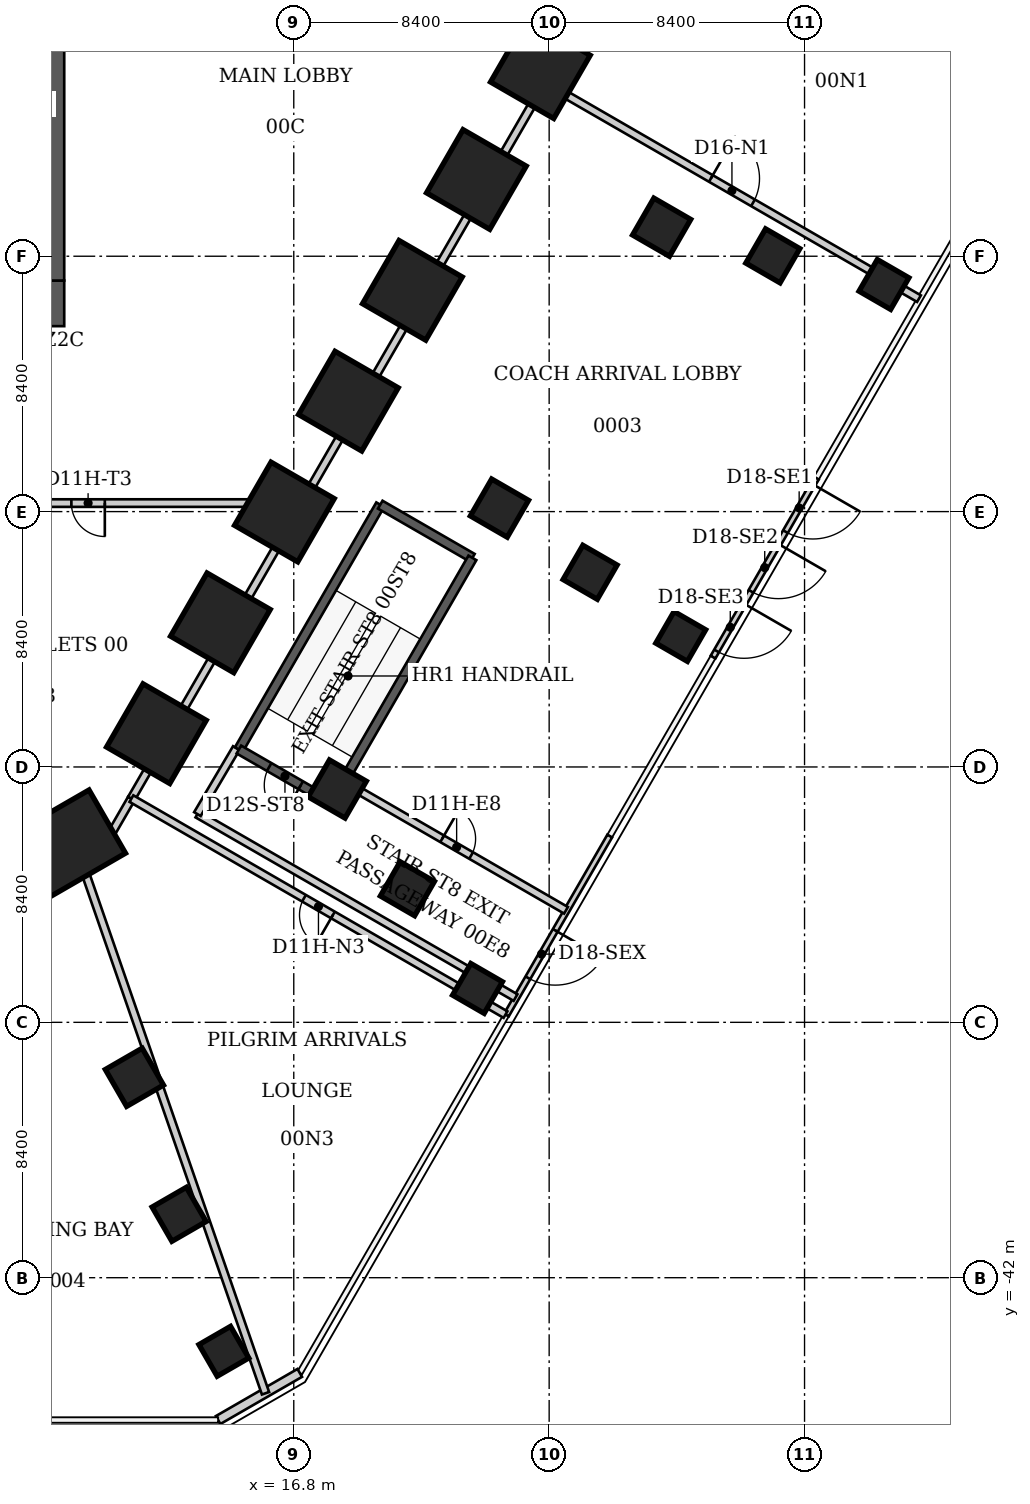
"""IFC4 building model, lengths in metres.
Left out: names, types, materials, properties, quantities, classifications, styles, units other than length and angle.
Written with IfcOpenShell. Run it as: python <this file> out.ifc"""

import sys

from ifc_helpers import new_model, si_unit, direction, frame, frame_2d, origin, origin_2d, place, context, subcontext, project, spatial, rectangle, extrude, element, fill, save


model = new_model("IFC4")
c1 = context("Model", 3, precision=1e-05, world=origin(), true_north=direction((0.0, 1.0)))
c2 = subcontext(c1, "Body", "Model", "MODEL_VIEW")
j1 = project(units=[si_unit("LENGTHUNIT", "METRE"), si_unit("PLANEANGLEUNIT", "RADIAN")], contexts=[c1])
p1 = place(None, origin())
s1 = spatial("IfcSite", under=j1, at=p1, CompositionType="ELEMENT")
p2 = place(p1, origin())
s2 = spatial("IfcBuilding", under=s1, at=p2, CompositionType="ELEMENT")
p3 = place(p2, origin())
s3 = spatial("IfcBuildingStorey", under=s2, at=p3, CompositionType="ELEMENT", Elevation=0.0)
for number, where, z_axis, x_axis in (
    (1, (24.911, -2.23, -0.2), (0.0, 0.0, 1.0), (0.866, -0.5, 0.0)),
    (2, (22.806, -5.875, -0.2), (0.0, 0.0, 1.0), (0.866, -0.5, 0.0)),
    (3, (20.701, -9.521, -0.2), (0.0, 0.0, 1.0), (0.866, -0.5, 0.0)),
    (4, (18.596, -13.167, -0.2), (0.0, 0.0, 1.0), (0.866, -0.5, 0.0)),
    (5, (16.491, -16.813, -0.2), (0.0, 0.0, 1.0), (0.866, -0.5, 0.0)),
    (6, (14.387, -20.459, -0.2), (0.0, 0.0, 1.0), (0.866, -0.5, 0.0)),
    (7, (12.282, -24.105, -0.2), (0.0, 0.0, 1.0), (0.866, -0.5, 0.0)),
):
    element("IfcColumn", number, at=place(p3, frame(where, z_axis=z_axis, x_axis=x_axis)), inside=s3, PredefinedType="COLUMN", context=c2, shape_type="SweptSolid", body=[
        extrude(rectangle(XDim=2.4, YDim=2.4, at=origin_2d()), origin(), (0.0, 0.0, 1.0), 6.2),
    ])
p4 = place(p3, frame((9.106, -27.897, -0.2), z_axis=(0.0, 0.0, 1.0), x_axis=(0.5, -0.866025403784, 0.0)))
e8 = element("IfcColumn", 8, at=p4, inside=s3, PredefinedType="COLUMN", context=c2, shape_type="SweptSolid", body=[
    extrude(rectangle(XDim=2.4, YDim=3.6, at=origin_2d()), origin(), (0.0, 0.0, 1.0), 6.2),
])
for number, where, z_axis, x_axis in (
    (9, (28.9, -7.445, -0.2), (0.0, 0.0, 1.0), (0.866, -0.5, 0.0)),
    (10, (23.565, -16.686, -0.2), (0.0, 0.0, 1.0), (0.866, -0.5, 0.0)),
    (11, (18.23, -25.926, -0.2), (0.0, 0.0, 1.0), (0.866, -0.5, 0.0)),
    (12, (11.558, -35.408, -0.2), (0.0, 0.0, 1.0), (0.5, -0.866, 0.0)),
):
    element("IfcColumn", number, at=place(p3, frame(where, z_axis=z_axis, x_axis=x_axis)), inside=s3, PredefinedType="COLUMN", context=c2, shape_type="SweptSolid", body=[
        extrude(rectangle(XDim=1.4, YDim=1.4, at=origin_2d()), origin(), (0.0, 0.0, 1.0), 6.2),
    ])
for number, where, z_axis, x_axis in (
    (13, (32.556, -8.387, -0.2), (0.0, 0.0, 1.0), (0.866, -0.5, 0.0)),
    (14, (26.547, -18.796, -0.2), (0.0, 0.0, 1.0), (0.866, -0.5, 0.0)),
    (15, (20.537, -29.205, -0.2), (0.0, 0.0, 1.0), (0.866, -0.5, 0.0)),
    (16, (13.029, -39.915, -0.2), (0.0, 0.0, 1.0), (0.5, -0.866, 0.0)),
):
    element("IfcColumn", number, at=place(p3, frame(where, z_axis=z_axis, x_axis=x_axis)), inside=s3, PredefinedType="COLUMN", context=c2, shape_type="SweptSolid", body=[
        extrude(rectangle(XDim=1.3, YDim=1.3, at=origin_2d()), origin(), (0.0, 0.0, 1.0), 6.2),
    ])
for number, where, z_axis, x_axis in (
    (17, (36.212, -9.329, -0.2), (0.0, 0.0, 1.0), (0.866, -0.5, 0.0)),
    (18, (29.528, -20.907, -0.2), (0.0, 0.0, 1.0), (0.866, -0.5, 0.0)),
    (19, (22.843, -32.485, -0.2), (0.0, 0.0, 1.0), (0.866, -0.5, 0.0)),
    (20, (14.5, -44.421, -0.2), (0.0, 0.0, 1.0), (0.5, -0.866, 0.0)),
):
    element("IfcColumn", number, at=place(p3, frame(where, z_axis=z_axis, x_axis=x_axis)), inside=s3, PredefinedType="COLUMN", context=c2, shape_type="SweptSolid", body=[
        extrude(rectangle(XDim=1.2, YDim=1.2, at=origin_2d()), origin(), (0.0, 0.0, 1.0), 6.2),
    ])
p5 = place(p3, frame((-9.25, -9.95, -0.2), z_axis=(0.0, 0.0, 1.0), x_axis=(1.0, 0.0, 0.0)))
e21 = element("IfcWall", 21, at=p5, inside=s3, PredefinedType="SHEAR", context=c2, shape_type="SweptSolid", body=[
    extrude(rectangle(XDim=18.5, YDim=1.5, at=frame_2d((9.25, 0.0))), origin(), (0.0, 0.0, 1.0), 6.2),
])
p6 = place(p5, frame((2.137, 0.0, 0.2)))
e22 = element("IfcOpeningElement", 22, at=p6, cuts=e21, PredefinedType="OPENING", context=c2, shape_type="SweptSolid", body=[
    extrude(rectangle(XDim=1.1, YDim=2.1, at=frame_2d((0.55, 1.05))), frame((0.0, 0.75, 0.0), z_axis=(0.0, -1.0, 0.0), x_axis=(1.0, 0.0, 0.0)), (0.0, 0.0, 1.0), 1.5),
])
p7 = place(p5, frame((4.762, 0.0, 0.2)))
e23 = element("IfcOpeningElement", 23, at=p7, cuts=e21, PredefinedType="OPENING", context=c2, shape_type="SweptSolid", body=[
    extrude(rectangle(XDim=1.1, YDim=2.1, at=frame_2d((0.55, 1.05))), frame((0.0, 0.75, 0.0), z_axis=(0.0, -1.0, 0.0), x_axis=(1.0, 0.0, 0.0)), (0.0, 0.0, 1.0), 1.5),
])
p8 = place(p5, frame((7.387, 0.0, 0.2)))
e24 = element("IfcOpeningElement", 24, at=p8, cuts=e21, PredefinedType="OPENING", context=c2, shape_type="SweptSolid", body=[
    extrude(rectangle(XDim=1.1, YDim=2.1, at=frame_2d((0.55, 1.05))), frame((0.0, 0.75, 0.0), z_axis=(0.0, -1.0, 0.0), x_axis=(1.0, 0.0, 0.0)), (0.0, 0.0, 1.0), 1.5),
])
p9 = place(p5, frame((10.012, 0.0, 0.2)))
e25 = element("IfcOpeningElement", 25, at=p9, cuts=e21, PredefinedType="OPENING", context=c2, shape_type="SweptSolid", body=[
    extrude(rectangle(XDim=1.1, YDim=2.1, at=frame_2d((0.55, 1.05))), frame((0.0, 0.75, 0.0), z_axis=(0.0, -1.0, 0.0), x_axis=(1.0, 0.0, 0.0)), (0.0, 0.0, 1.0), 1.5),
])
p10 = place(p5, frame((12.637, 0.0, 0.2)))
e26 = element("IfcOpeningElement", 26, at=p10, cuts=e21, PredefinedType="OPENING", context=c2, shape_type="SweptSolid", body=[
    extrude(rectangle(XDim=1.1, YDim=2.1, at=frame_2d((0.55, 1.05))), frame((0.0, 0.75, 0.0), z_axis=(0.0, -1.0, 0.0), x_axis=(1.0, 0.0, 0.0)), (0.0, 0.0, 1.0), 1.5),
])
p11 = place(p5, frame((15.262, 0.0, 0.2)))
e27 = element("IfcOpeningElement", 27, at=p11, cuts=e21, PredefinedType="OPENING", context=c2, shape_type="SweptSolid", body=[
    extrude(rectangle(XDim=1.1, YDim=2.1, at=frame_2d((0.55, 1.05))), frame((0.0, 0.75, 0.0), z_axis=(0.0, -1.0, 0.0), x_axis=(1.0, 0.0, 0.0)), (0.0, 0.0, 1.0), 1.5),
])
p12 = place(p3, frame((8.5, -9.2, -0.2), z_axis=(0.0, 0.0, 1.0), x_axis=(0.0, 1.0, 0.0)))
e28 = element("IfcWall", 28, at=p12, inside=s3, PredefinedType="SHEAR", context=c2, shape_type="SweptSolid", body=[
    extrude(rectangle(XDim=15.3, YDim=1.5, at=frame_2d((7.65, 0.0))), origin(), (0.0, 0.0, 1.0), 6.2),
])
p13 = place(p12, frame((10.7, 0.0, 0.2)))
e29 = element("IfcOpeningElement", 29, at=p13, cuts=e28, PredefinedType="OPENING", context=c2, shape_type="SweptSolid", body=[
    extrude(rectangle(XDim=1.2, YDim=2.2, at=frame_2d((0.6, 1.1))), frame((0.0, 0.75, 0.0), z_axis=(0.0, -1.0, 0.0), x_axis=(1.0, 0.0, 0.0)), (0.0, 0.0, 1.0), 1.5),
])
p14 = place(p3, frame((33.99, -15.699, 0.0), z_axis=(0.0, 0.0, 1.0), x_axis=(-0.500013675503, -0.866017508085, 0.0)))
e30 = element("IfcWall", 30, at=p14, inside=s3, PredefinedType="SOLIDWALL", context=c2, shape_type="SweptSolid", body=[
    extrude(rectangle(XDim=6.797, YDim=0.18, at=frame_2d((3.398, 0.0))), origin(), (0.0, 0.0, 1.0), 5.84),
])
p15 = place(p14, frame((0.233, 0.0, 0.0)))
e31 = element("IfcOpeningElement", 31, at=p15, cuts=e30, PredefinedType="OPENING", context=c2, shape_type="SweptSolid", body=[
    extrude(rectangle(XDim=1.8, YDim=2.7, at=frame_2d((0.9, 1.35))), frame((0.0, 0.09, 0.0), z_axis=(0.0, -1.0, 0.0), x_axis=(1.0, 0.0, 0.0)), (0.0, 0.0, 1.0), 0.18),
])
p16 = place(p14, frame((2.499, 0.0, 0.0)))
e32 = element("IfcOpeningElement", 32, at=p16, cuts=e30, PredefinedType="OPENING", context=c2, shape_type="SweptSolid", body=[
    extrude(rectangle(XDim=1.8, YDim=2.7, at=frame_2d((0.9, 1.35))), frame((0.0, 0.09, 0.0), z_axis=(0.0, -1.0, 0.0), x_axis=(1.0, 0.0, 0.0)), (0.0, 0.0, 1.0), 0.18),
])
p17 = place(p14, frame((4.764, 0.0, 0.0)))
e33 = element("IfcOpeningElement", 33, at=p17, cuts=e30, PredefinedType="OPENING", context=c2, shape_type="SweptSolid", body=[
    extrude(rectangle(XDim=1.8, YDim=2.7, at=frame_2d((0.9, 1.35))), frame((0.0, 0.09, 0.0), z_axis=(0.0, -1.0, 0.0), x_axis=(1.0, 0.0, 0.0)), (0.0, 0.0, 1.0), 0.18),
])
p18 = place(p3, frame((27.192, -27.472, 0.0), z_axis=(0.0, 0.0, 1.0), x_axis=(-0.500013675503, -0.866017508085, 0.0)))
e34 = element("IfcWall", 34, at=p18, inside=s3, PredefinedType="SOLIDWALL", context=c2, shape_type="SweptSolid", body=[
    extrude(rectangle(XDim=6.797, YDim=0.18, at=frame_2d((3.398, 0.0))), origin(), (0.0, 0.0, 1.0), 5.84),
])
p19 = place(p18, frame((3.584, 0.0, 0.0)))
e35 = element("IfcOpeningElement", 35, at=p19, cuts=e34, PredefinedType="OPENING", context=c2, shape_type="SweptSolid", body=[
    extrude(rectangle(XDim=1.8, YDim=2.7, at=frame_2d((0.9, 1.35))), frame((0.0, 0.09, 0.0), z_axis=(0.0, -1.0, 0.0), x_axis=(1.0, 0.0, 0.0)), (0.0, 0.0, 1.0), 0.18),
])
p20 = place(p3, frame((16.997, -45.132, 0.0), z_axis=(0.0, 0.0, 1.0), x_axis=(-0.86600983753, -0.500026960575, 0.0)))
e36 = element("IfcWall", 36, at=p20, inside=s3, PredefinedType="SOLIDWALL", context=c2, shape_type="SweptSolid", body=[
    extrude(rectangle(XDim=3.1, YDim=0.3, at=frame_2d((1.55, 0.0))), origin(), (0.0, 0.0, 1.0), 5.84),
])
p21 = place(p3, frame((8.65, -29.11, 0.0), z_axis=(0.0, 0.0, 1.0), x_axis=(0.865736025111, 0.500500883941, 0.0)))
e37 = element("IfcWall", 37, at=p21, inside=s3, PredefinedType="PARTITIONING", context=c2, shape_type="SweptSolid", body=[
    extrude(rectangle(XDim=1.384, YDim=0.25, at=frame_2d((0.692, 0.0))), origin(), (0.0, 0.0, 1.0), 5.84),
])
p22 = place(p3, frame((9.85, -28.42, 0.0), z_axis=(0.0, 0.0, 1.0), x_axis=(0.327267371913, -0.944931779168, 0.0)))
e38 = element("IfcWall", 38, at=p22, inside=s3, PredefinedType="PARTITIONING", context=c2, shape_type="SweptSolid", body=[
    extrude(rectangle(XDim=18.395, YDim=0.25, at=frame_2d((9.197, 0.0))), origin(), (0.0, 0.0, 1.0), 5.75),
])
p23 = place(p3, frame((10.38, -28.11, 0.0), z_axis=(0.0, 0.0, 1.0), x_axis=(-0.865714845822, -0.5005375168, 0.0)))
e39 = element("IfcWall", 39, at=p23, inside=s3, PredefinedType="PARTITIONING", context=c2, shape_type="SweptSolid", body=[
    extrude(rectangle(XDim=0.579, YDim=0.25, at=frame_2d((0.29, 0.0))), origin(), (0.0, 0.0, 1.0), 5.84),
])
p24 = place(p3, frame((10.38, -28.11, 0.0), z_axis=(0.0, 0.0, 1.0), x_axis=(0.500126914667, 0.865952117167, 0.0)))
e40 = element("IfcWall", 40, at=p24, inside=s3, PredefinedType="PARTITIONING", context=c2, shape_type="SweptSolid", body=[
    extrude(rectangle(XDim=2.16, YDim=0.25, at=frame_2d((1.08, 0.0))), origin(), (0.0, 0.0, 1.0), 5.84),
])
p25 = place(p3, frame((11.46, -26.24, 0.0), z_axis=(0.0, 0.0, 1.0), x_axis=(0.500553622729, 0.865705533523, 0.0)))
e41 = element("IfcWall", 41, at=p25, inside=s3, PredefinedType="PARTITIONING", context=c2, shape_type="SweptSolid", body=[
    extrude(rectangle(XDim=11.228, YDim=0.25, at=frame_2d((5.614, 0.0))), origin(), (0.0, 0.0, 1.0), 4.04),
])
p26 = place(p3, frame((13.63, -26.75, 0.0), z_axis=(0.0, 0.0, 1.0), x_axis=(0.866259937365, -0.49959355572, 0.0)))
e42 = element("IfcWall", 42, at=p26, inside=s3, PredefinedType="PARTITIONING", context=c2, shape_type="SweptSolid", body=[
    extrude(rectangle(XDim=12.08, YDim=0.25, at=frame_2d((6.04, 0.0))), origin(), (0.0, 0.0, 1.0), 5.75),
])
p27 = place(p3, frame((14.91, -24.58, 0.0), z_axis=(0.0, 0.0, 1.0), x_axis=(-0.508082727165, -0.861308273707, 0.0)))
e43 = element("IfcWall", 43, at=p27, inside=s3, PredefinedType="PARTITIONING", context=c2, shape_type="SweptSolid", body=[
    extrude(rectangle(XDim=2.519, YDim=0.25, at=frame_2d((1.26, 0.0))), origin(), (0.0, 0.0, 1.0), 5.84),
])
p28 = place(p3, frame((17.07, -16.52, 0.0), z_axis=(0.0, 0.0, 1.0), x_axis=(-1.0, 0.0, 0.0)))
e44 = element("IfcWall", 44, at=p28, inside=s3, PredefinedType="PARTITIONING", context=c2, shape_type="SweptSolid", body=[
    extrude(rectangle(XDim=14.07, YDim=0.25, at=frame_2d((7.035, 0.0))), origin(), (0.0, 0.0, 1.0), 5.84),
])
p29 = place(p28, frame((6.485, 0.0, 0.0)))
e45 = element("IfcOpeningElement", 45, at=p29, cuts=e44, PredefinedType="OPENING", context=c2, shape_type="SweptSolid", body=[
    extrude(rectangle(XDim=1.1, YDim=2.2, at=frame_2d((0.55, 1.1))), frame((0.0, 0.125, 0.0), z_axis=(0.0, -1.0, 0.0), x_axis=(1.0, 0.0, 0.0)), (0.0, 0.0, 1.0), 0.25),
])
p30 = place(p3, frame((17.07, -16.52, 0.0), z_axis=(0.0, 0.0, 1.0), x_axis=(0.500243727505, 0.865884641908, 0.0)))
e46 = element("IfcWall", 46, at=p30, inside=s3, PredefinedType="PARTITIONING", context=c2, shape_type="SweptSolid", body=[
    extrude(rectangle(XDim=15.972, YDim=0.25, at=frame_2d((7.986, 0.0))), origin(), (0.0, 0.0, 1.0), 4.04),
])
p31 = place(p3, frame((18.56, -25.76, 0.0), z_axis=(0.0, 0.0, 1.0), x_axis=(0.865938897634, -0.500149803123, 0.0)))
e47 = element("IfcWall", 47, at=p31, inside=s3, PredefinedType="PARTITIONING", context=c2, shape_type="SweptSolid", body=[
    extrude(rectangle(XDim=8.308, YDim=0.25, at=frame_2d((4.154, 0.0))), origin(), (0.0, 0.0, 1.0), 5.75),
])
p32 = place(p31, frame((3.604, 0.0, 0.0)))
e48 = element("IfcOpeningElement", 48, at=p32, cuts=e47, PredefinedType="OPENING", context=c2, shape_type="SweptSolid", body=[
    extrude(rectangle(XDim=1.1, YDim=2.2, at=frame_2d((0.55, 1.1))), frame((0.0, 0.125, 0.0), z_axis=(0.0, -1.0, 0.0), x_axis=(1.0, 0.0, 0.0)), (0.0, 0.0, 1.0), 0.25),
])
p33 = place(p3, frame((23.764, -33.345, 0.0), z_axis=(0.0, 0.0, 1.0), x_axis=(-0.865986126124, 0.500068024733, 0.0)))
e49 = element("IfcWall", 49, at=p33, inside=s3, PredefinedType="PARTITIONING", context=c2, shape_type="SweptSolid", body=[
    extrude(rectangle(XDim=14.208, YDim=0.25, at=frame_2d((7.104, 0.0))), origin(), (0.0, 0.0, 1.0), 5.75),
])
p34 = place(p33, frame((6.554, 0.0, 0.0)))
e50 = element("IfcOpeningElement", 50, at=p34, cuts=e49, PredefinedType="OPENING", context=c2, shape_type="SweptSolid", body=[
    extrude(rectangle(XDim=1.1, YDim=2.2, at=frame_2d((0.55, 1.1))), frame((0.0, 0.125, 0.0), z_axis=(0.0, -1.0, 0.0), x_axis=(1.0, 0.0, 0.0)), (0.0, 0.0, 1.0), 0.25),
])
p35 = place(p3, frame((25.06, -2.69, 0.0), z_axis=(0.0, 0.0, 1.0), x_axis=(0.500462066422, 0.865758465204, 0.0)))
e51 = element("IfcWall", 51, at=p35, inside=s3, PredefinedType="PARTITIONING", context=c2, shape_type="SweptSolid", body=[
    extrude(rectangle(XDim=8.952, YDim=0.25, at=frame_2d((4.476, 0.0))), origin(), (0.0, 0.0, 1.0), 4.04),
])
p36 = place(p3, frame((25.06, -2.69, 0.0), z_axis=(0.0, 0.0, 1.0), x_axis=(0.865986126124, -0.500068024733, 0.0)))
e52 = element("IfcWall", 52, at=p36, inside=s3, PredefinedType="PARTITIONING", context=c2, shape_type="SweptSolid", body=[
    extrude(rectangle(XDim=14.208, YDim=0.25, at=frame_2d((7.104, 0.0))), origin(), (0.0, 0.0, 1.0), 5.75),
])
p37 = place(p36, frame((6.304, 0.0, 0.0)))
e53 = element("IfcOpeningElement", 53, at=p37, cuts=e52, PredefinedType="OPENING", context=c2, shape_type="SweptSolid", body=[
    extrude(rectangle(XDim=1.6, YDim=2.4, at=frame_2d((0.8, 1.2))), frame((0.0, 0.125, 0.0), z_axis=(0.0, -1.0, 0.0), x_axis=(1.0, 0.0, 0.0)), (0.0, 0.0, 1.0), 0.25),
])
p38 = place(p3, frame((14.994, -24.626, 0.0), z_axis=(0.0, 0.0, 1.0), x_axis=(0.500015592816, 0.866016401081, 0.0)))
e54 = element("IfcWall", 54, at=p38, inside=s3, PredefinedType="SHEAR", context=c2, shape_type="SweptSolid", body=[
    extrude(rectangle(XDim=9.3, YDim=0.3, at=frame_2d((4.65, 0.0))), origin(), (0.0, 0.0, 1.0), 6.0),
])
p39 = place(p3, frame((19.645, -16.572, 0.0), z_axis=(0.0, 0.0, 1.0), x_axis=(0.866019471182, -0.500010275428, 0.0)))
e55 = element("IfcWall", 55, at=p39, inside=s3, PredefinedType="SHEAR", context=c2, shape_type="SweptSolid", body=[
    extrude(rectangle(XDim=3.5, YDim=0.3, at=frame_2d((1.75, 0.0))), origin(), (0.0, 0.0, 1.0), 6.0),
])
p40 = place(p3, frame((22.676, -18.322, 0.0), z_axis=(0.0, 0.0, 1.0), x_axis=(-0.499995904083, -0.86602776855, 0.0)))
e56 = element("IfcWall", 56, at=p40, inside=s3, PredefinedType="SHEAR", context=c2, shape_type="SweptSolid", body=[
    extrude(rectangle(XDim=9.3, YDim=0.3, at=frame_2d((4.65, 0.0))), origin(), (0.0, 0.0, 1.0), 6.0),
])
p41 = place(p3, frame((18.026, -26.376, 0.0), z_axis=(0.0, 0.0, 1.0), x_axis=(-0.866036909293, 0.499980071345, 0.0)))
e57 = element("IfcWall", 57, at=p41, inside=s3, PredefinedType="SHEAR", context=c2, shape_type="SweptSolid", body=[
    extrude(rectangle(XDim=3.5, YDim=0.3, at=frame_2d((1.75, 0.0))), origin(), (0.0, 0.0, 1.0), 6.0),
])
p42 = place(p41, frame((1.15, 0.0, 0.0)))
e58 = element("IfcOpeningElement", 58, at=p42, cuts=e57, PredefinedType="OPENING", context=c2, shape_type="SweptSolid", body=[
    extrude(rectangle(XDim=1.2, YDim=2.4, at=frame_2d((0.6, 1.2))), frame((0.0, 0.15, 0.0), z_axis=(0.0, -1.0, 0.0), x_axis=(1.0, 0.0, 0.0)), (0.0, 0.0, 1.0), 0.3),
])
p43 = place(p15, origin())
e59 = element("IfcDoor", 59, at=p43, inside=s3, OperationType="SINGLE_SWING_LEFT", PredefinedType="DOOR", context=c2, shape_type="SweptSolid", body=[
    extrude(rectangle(XDim=1.8, YDim=2.7, at=frame_2d((0.9, 1.35))), frame((0.0, 0.025, 0.0), z_axis=(0.0, -1.0, 0.0), x_axis=(1.0, 0.0, 0.0)), (0.0, 0.0, 1.0), 0.05),
])
fill(e31, e59)
p44 = place(p16, origin())
e60 = element("IfcDoor", 60, at=p44, inside=s3, OperationType="SINGLE_SWING_LEFT", PredefinedType="DOOR", context=c2, shape_type="SweptSolid", body=[
    extrude(rectangle(XDim=1.8, YDim=2.7, at=frame_2d((0.9, 1.35))), frame((0.0, 0.025, 0.0), z_axis=(0.0, -1.0, 0.0), x_axis=(1.0, 0.0, 0.0)), (0.0, 0.0, 1.0), 0.05),
])
fill(e32, e60)
p45 = place(p17, origin())
e61 = element("IfcDoor", 61, at=p45, inside=s3, OperationType="SINGLE_SWING_LEFT", PredefinedType="DOOR", context=c2, shape_type="SweptSolid", body=[
    extrude(rectangle(XDim=1.8, YDim=2.7, at=frame_2d((0.9, 1.35))), frame((0.0, 0.025, 0.0), z_axis=(0.0, -1.0, 0.0), x_axis=(1.0, 0.0, 0.0)), (0.0, 0.0, 1.0), 0.05),
])
fill(e33, e61)
p46 = place(p19, origin())
e62 = element("IfcDoor", 62, at=p46, inside=s3, OperationType="SINGLE_SWING_LEFT", PredefinedType="DOOR", context=c2, shape_type="SweptSolid", body=[
    extrude(rectangle(XDim=1.8, YDim=2.7, at=frame_2d((0.9, 1.35))), frame((0.0, 0.025, 0.0), z_axis=(0.0, -1.0, 0.0), x_axis=(1.0, 0.0, 0.0)), (0.0, 0.0, 1.0), 0.05),
])
fill(e35, e62)
p47 = place(p32, origin())
e63 = element("IfcDoor", 63, at=p47, inside=s3, OperationType="SINGLE_SWING_LEFT", PredefinedType="DOOR", context=c2, shape_type="SweptSolid", body=[
    extrude(rectangle(XDim=1.1, YDim=2.2, at=frame_2d((0.55, 1.1))), frame((0.0, 0.025, 0.0), z_axis=(0.0, -1.0, 0.0), x_axis=(1.0, 0.0, 0.0)), (0.0, 0.0, 1.0), 0.05),
])
fill(e48, e63)
p48 = place(p37, origin())
e64 = element("IfcDoor", 64, at=p48, inside=s3, OperationType="DOUBLE_DOOR_SINGLE_SWING", PredefinedType="DOOR", context=c2, shape_type="SweptSolid", body=[
    extrude(rectangle(XDim=1.6, YDim=2.4, at=frame_2d((0.8, 1.2))), frame((0.0, 0.025, 0.0), z_axis=(0.0, -1.0, 0.0), x_axis=(1.0, 0.0, 0.0)), (0.0, 0.0, 1.0), 0.05),
])
fill(e53, e64)
p49 = place(p34, origin())
e65 = element("IfcDoor", 65, at=p49, inside=s3, OperationType="SINGLE_SWING_LEFT", PredefinedType="DOOR", context=c2, shape_type="SweptSolid", body=[
    extrude(rectangle(XDim=1.1, YDim=2.2, at=frame_2d((0.55, 1.1))), frame((0.0, 0.025, 0.0), z_axis=(0.0, -1.0, 0.0), x_axis=(1.0, 0.0, 0.0)), (0.0, 0.0, 1.0), 0.05),
])
fill(e50, e65)
p50 = place(p29, origin())
e66 = element("IfcDoor", 66, at=p50, inside=s3, OperationType="SINGLE_SWING_LEFT", PredefinedType="DOOR", context=c2, shape_type="SweptSolid", body=[
    extrude(rectangle(XDim=1.1, YDim=2.2, at=frame_2d((0.55, 1.1))), frame((0.0, 0.025, 0.0), z_axis=(0.0, -1.0, 0.0), x_axis=(1.0, 0.0, 0.0)), (0.0, 0.0, 1.0), 0.05),
])
fill(e45, e66)
p51 = place(p42, origin())
e67 = element("IfcDoor", 67, at=p51, inside=s3, OperationType="SINGLE_SWING_LEFT", PredefinedType="DOOR", context=c2, shape_type="SweptSolid", body=[
    extrude(rectangle(XDim=1.2, YDim=2.4, at=frame_2d((0.6, 1.2))), frame((0.0, 0.025, 0.0), z_axis=(0.0, -1.0, 0.0), x_axis=(1.0, 0.0, 0.0)), (0.0, 0.0, 1.0), 0.05),
])
fill(e58, e67)
save(model, sys.argv[1])
